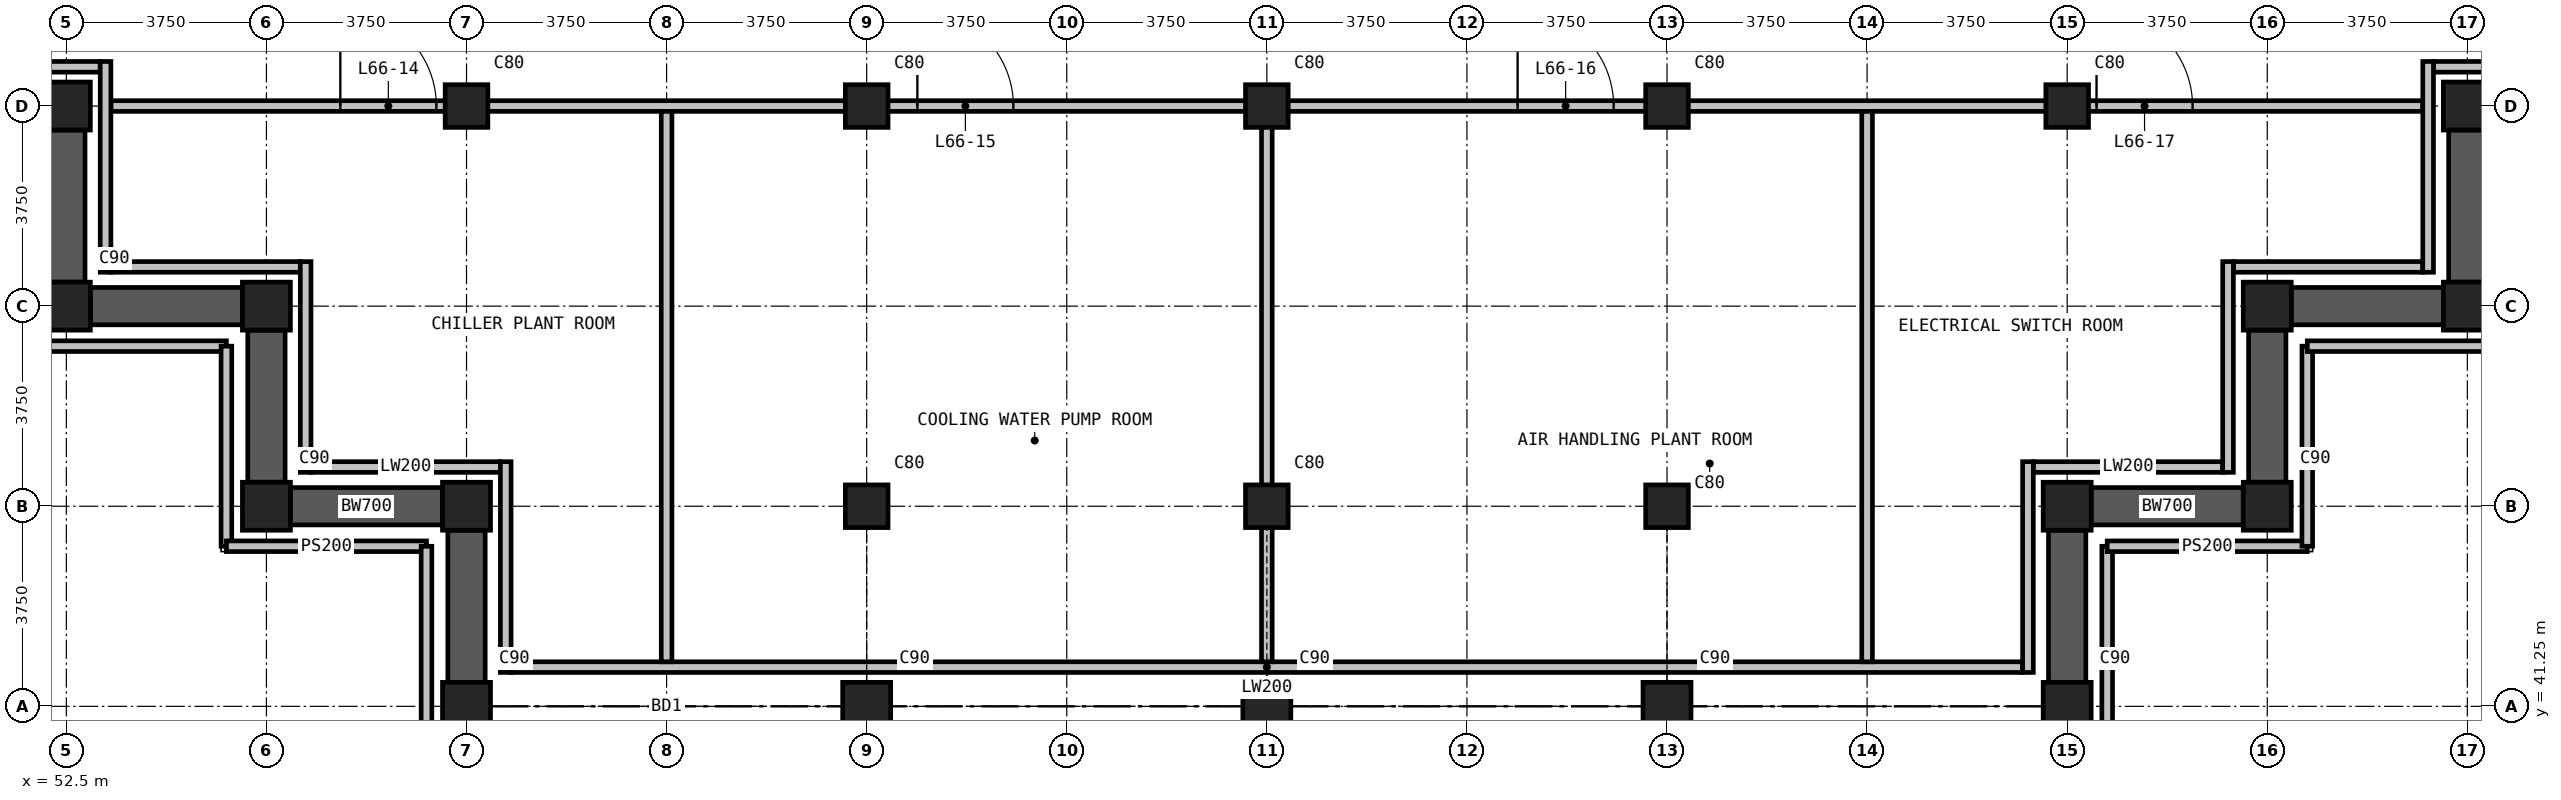
"""IFC4 building model, lengths in metres.
Left out: names, types, materials, properties, quantities, classifications, styles, units other than length and angle.
Written with IfcOpenShell. Run it as: python <this file> out.ifc"""

import sys

from ifc_helpers import new_model, si_unit, direction, frame, frame_2d, origin, origin_2d, place, context, subcontext, project, spatial, rectangle, extrude, element, fill, save


model = new_model("IFC4")
c1 = context("Model", 3, precision=1e-05, world=origin(), true_north=direction((0.0, 1.0)))
c2 = subcontext(c1, "Body", "Model", "MODEL_VIEW")
j1 = project(units=[si_unit("LENGTHUNIT", "METRE"), si_unit("PLANEANGLEUNIT", "RADIAN")], contexts=[c1])
p1 = place(None, origin())
s1 = spatial("IfcSite", under=j1, at=p1, CompositionType="ELEMENT")
p2 = place(p1, origin())
s2 = spatial("IfcBuilding", under=s1, at=p2, CompositionType="ELEMENT")
p3 = place(p2, frame((0.0, 0.0, 253.5)))
s3 = spatial("IfcBuildingStorey", under=s2, at=p3, CompositionType="ELEMENT", Elevation=253.5)
for number, where, z_axis, x_axis in (
    (1, (52.5, 48.75, 0.0), (0.0, 0.0, 1.0), (1.0, 0.0, 0.0)),
    (2, (52.5, 52.5, 0.0), (0.0, 0.0, 1.0), (1.0, 0.0, 0.0)),
    (3, (56.25, 45.0, 0.0), (0.0, 0.0, 1.0), (1.0, 0.0, 0.0)),
    (4, (56.25, 48.75, 0.0), (0.0, 0.0, 1.0), (1.0, 0.0, 0.0)),
    (5, (60.0, 41.25, 0.0), (0.0, 0.0, 1.0), (1.0, 0.0, 0.0)),
    (6, (60.0, 45.0, 0.0), (0.0, 0.0, 1.0), (1.0, 0.0, 0.0)),
):
    element("IfcColumn", number, at=place(p3, frame(where, z_axis=z_axis, x_axis=x_axis)), inside=s3, PredefinedType="COLUMN", context=c2, shape_type="SweptSolid", body=[
        extrude(rectangle(XDim=0.9, YDim=0.9, at=origin_2d()), origin(), (0.0, 0.0, 1.0), 5.0),
    ])
p4 = place(p3, frame((60.0, 52.5, 0.0), z_axis=(0.0, 0.0, 1.0), x_axis=(1.0, 0.0, 0.0)))
e7 = element("IfcColumn", 7, at=p4, inside=s3, PredefinedType="COLUMN", context=c2, shape_type="SweptSolid", body=[
    extrude(rectangle(XDim=0.8, YDim=0.8, at=origin_2d()), origin(), (0.0, 0.0, 1.0), 5.0),
])
p5 = place(p3, frame((67.5, 41.25, 0.0), z_axis=(0.0, 0.0, 1.0), x_axis=(1.0, 0.0, 0.0)))
e8 = element("IfcColumn", 8, at=p5, inside=s3, PredefinedType="COLUMN", context=c2, shape_type="SweptSolid", body=[
    extrude(rectangle(XDim=0.9, YDim=0.9, at=origin_2d()), origin(), (0.0, 0.0, 1.0), 5.0),
])
for number, where, z_axis, x_axis in (
    (9, (67.5, 45.0, 0.0), (0.0, 0.0, 1.0), (1.0, 0.0, 0.0)),
    (10, (67.5, 52.5, 0.0), (0.0, 0.0, 1.0), (1.0, 0.0, 0.0)),
):
    element("IfcColumn", number, at=place(p3, frame(where, z_axis=z_axis, x_axis=x_axis)), inside=s3, PredefinedType="COLUMN", context=c2, shape_type="SweptSolid", body=[
        extrude(rectangle(XDim=0.8, YDim=0.8, at=origin_2d()), origin(), (0.0, 0.0, 1.0), 5.0),
    ])
p6 = place(p3, frame((75.0, 41.25, 0.0), z_axis=(0.0, 0.0, 1.0), x_axis=(1.0, 0.0, 0.0)))
e11 = element("IfcColumn", 11, at=p6, inside=s3, PredefinedType="COLUMN", context=c2, shape_type="SweptSolid", body=[
    extrude(rectangle(XDim=0.9, YDim=0.9, at=origin_2d()), origin(), (0.0, 0.0, 1.0), 5.0),
])
for number, where, z_axis, x_axis in (
    (12, (75.0, 45.0, 0.0), (0.0, 0.0, 1.0), (1.0, 0.0, 0.0)),
    (13, (75.0, 52.5, 0.0), (0.0, 0.0, 1.0), (1.0, 0.0, 0.0)),
):
    element("IfcColumn", number, at=place(p3, frame(where, z_axis=z_axis, x_axis=x_axis)), inside=s3, PredefinedType="COLUMN", context=c2, shape_type="SweptSolid", body=[
        extrude(rectangle(XDim=0.8, YDim=0.8, at=origin_2d()), origin(), (0.0, 0.0, 1.0), 5.0),
    ])
p7 = place(p3, frame((82.5, 41.25, 0.0), z_axis=(0.0, 0.0, 1.0), x_axis=(1.0, 0.0, 0.0)))
e14 = element("IfcColumn", 14, at=p7, inside=s3, PredefinedType="COLUMN", context=c2, shape_type="SweptSolid", body=[
    extrude(rectangle(XDim=0.9, YDim=0.9, at=origin_2d()), origin(), (0.0, 0.0, 1.0), 5.0),
])
for number, where, z_axis, x_axis in (
    (15, (82.5, 45.0, 0.0), (0.0, 0.0, 1.0), (1.0, 0.0, 0.0)),
    (16, (82.5, 52.5, 0.0), (0.0, 0.0, 1.0), (1.0, 0.0, 0.0)),
):
    element("IfcColumn", number, at=place(p3, frame(where, z_axis=z_axis, x_axis=x_axis)), inside=s3, PredefinedType="COLUMN", context=c2, shape_type="SweptSolid", body=[
        extrude(rectangle(XDim=0.8, YDim=0.8, at=origin_2d()), origin(), (0.0, 0.0, 1.0), 5.0),
    ])
for number, where, z_axis, x_axis in (
    (17, (90.0, 41.25, 0.0), (0.0, 0.0, 1.0), (1.0, 0.0, 0.0)),
    (18, (90.0, 45.0, 0.0), (0.0, 0.0, 1.0), (1.0, 0.0, 0.0)),
):
    element("IfcColumn", number, at=place(p3, frame(where, z_axis=z_axis, x_axis=x_axis)), inside=s3, PredefinedType="COLUMN", context=c2, shape_type="SweptSolid", body=[
        extrude(rectangle(XDim=0.9, YDim=0.9, at=origin_2d()), origin(), (0.0, 0.0, 1.0), 5.0),
    ])
p8 = place(p3, frame((90.0, 52.5, 0.0), z_axis=(0.0, 0.0, 1.0), x_axis=(1.0, 0.0, 0.0)))
e19 = element("IfcColumn", 19, at=p8, inside=s3, PredefinedType="COLUMN", context=c2, shape_type="SweptSolid", body=[
    extrude(rectangle(XDim=0.8, YDim=0.8, at=origin_2d()), origin(), (0.0, 0.0, 1.0), 5.0),
])
for number, where, z_axis, x_axis in (
    (20, (93.75, 45.0, 0.0), (0.0, 0.0, 1.0), (1.0, 0.0, 0.0)),
    (21, (93.75, 48.75, 0.0), (0.0, 0.0, 1.0), (1.0, 0.0, 0.0)),
    (22, (97.5, 48.75, 0.0), (0.0, 0.0, 1.0), (1.0, 0.0, 0.0)),
    (23, (97.5, 52.5, 0.0), (0.0, 0.0, 1.0), (1.0, 0.0, 0.0)),
):
    element("IfcColumn", number, at=place(p3, frame(where, z_axis=z_axis, x_axis=x_axis)), inside=s3, PredefinedType="COLUMN", context=c2, shape_type="SweptSolid", body=[
        extrude(rectangle(XDim=0.9, YDim=0.9, at=origin_2d()), origin(), (0.0, 0.0, 1.0), 5.0),
    ])
for number, where, z_axis, x_axis in (
    (24, (97.5, 52.05, 0.0), (0.0, 0.0, 1.0), (0.0, -1.0, 0.0)),
    (25, (97.05, 48.75, 0.0), (0.0, 0.0, 1.0), (-1.0, 0.0, 0.0)),
    (26, (93.75, 48.3, 0.0), (0.0, 0.0, 1.0), (0.0, -1.0, 0.0)),
    (27, (93.3, 45.0, 0.0), (0.0, 0.0, 1.0), (-1.0, 0.0, 0.0)),
    (28, (90.0, 44.55, 0.0), (0.0, 0.0, 1.0), (0.0, -1.0, 0.0)),
    (29, (60.0, 41.7, 0.0), (0.0, 0.0, 1.0), (0.0, 1.0, 0.0)),
    (30, (59.55, 45.0, 0.0), (0.0, 0.0, 1.0), (-1.0, 0.0, 0.0)),
    (31, (56.25, 45.45, 0.0), (0.0, 0.0, 1.0), (0.0, 1.0, 0.0)),
    (32, (55.8, 48.75, 0.0), (0.0, 0.0, 1.0), (-1.0, 0.0, 0.0)),
    (33, (52.5, 49.2, 0.0), (0.0, 0.0, 1.0), (0.0, 1.0, 0.0)),
):
    element("IfcWall", number, at=place(p3, frame(where, z_axis=z_axis, x_axis=x_axis)), inside=s3, PredefinedType="SHEAR", context=c2, shape_type="SweptSolid", body=[
        extrude(rectangle(XDim=2.85, YDim=0.7, at=frame_2d((1.425, 0.0))), origin(), (0.0, 0.0, 1.0), 4.7),
    ])
for number, where, z_axis, x_axis in (
    (34, (51.75, 48.0, 0.0), (0.0, 0.0, 1.0), (1.0, 0.0, 0.0)),
    (35, (55.5, 44.25, 0.0), (0.0, 0.0, 1.0), (0.0, 1.0, 0.0)),
    (36, (55.5, 44.25, 0.0), (0.0, 0.0, 1.0), (1.0, 0.0, 0.0)),
    (37, (59.25, 40.5, 0.0), (0.0, 0.0, 1.0), (0.0, 1.0, 0.0)),
    (38, (90.75, 40.5, 0.0), (0.0, 0.0, 1.0), (0.0, 1.0, 0.0)),
    (39, (90.75, 44.25, 0.0), (0.0, 0.0, 1.0), (1.0, 0.0, 0.0)),
    (40, (94.5, 44.25, 0.0), (0.0, 0.0, 1.0), (0.0, 1.0, 0.0)),
    (41, (94.5, 48.0, 0.0), (0.0, 0.0, 1.0), (1.0, 0.0, 0.0)),
):
    element("IfcWall", number, at=place(p3, frame(where, z_axis=z_axis, x_axis=x_axis)), inside=s3, PredefinedType="SOLIDWALL", context=c2, shape_type="SweptSolid", body=[
        extrude(rectangle(XDim=3.75, YDim=0.2, at=frame_2d((1.875, 0.0))), origin(), (0.0, 0.0, 1.0), 4.7),
    ])
p9 = place(p3, frame((60.835, 41.985, 0.0), z_axis=(0.0, 0.0, 1.0), x_axis=(1.0, 0.0, 0.0)))
e42 = element("IfcWall", 42, at=p9, inside=s3, PredefinedType="PARTITIONING", context=c2, shape_type="SweptSolid", body=[
    extrude(rectangle(XDim=28.33, YDim=0.2, at=frame_2d((14.165, 0.0))), origin(), (0.0, 0.0, 1.0), 4.7),
])
for number, where, z_axis, x_axis in (
    (43, (57.085, 45.735, 0.0), (0.0, 0.0, 1.0), (1.0, 0.0, 0.0)),
    (44, (89.365, 45.735, 0.0), (0.0, 0.0, 1.0), (1.0, 0.0, 0.0)),
    (45, (53.335, 49.485, 0.0), (0.0, 0.0, 1.0), (1.0, 0.0, 0.0)),
    (46, (93.115, 49.485, 0.0), (0.0, 0.0, 1.0), (1.0, 0.0, 0.0)),
):
    element("IfcWall", number, at=place(p3, frame(where, z_axis=z_axis, x_axis=x_axis)), inside=s3, PredefinedType="PARTITIONING", context=c2, shape_type="SweptSolid", body=[
        extrude(rectangle(XDim=3.55, YDim=0.2, at=frame_2d((1.775, 0.0))), origin(), (0.0, 0.0, 1.0), 4.7),
    ])
p10 = place(p3, frame((53.335, 52.5, 0.0), z_axis=(0.0, 0.0, 1.0), x_axis=(1.0, 0.0, 0.0)))
e47 = element("IfcWall", 47, at=p10, inside=s3, PredefinedType="PARTITIONING", context=c2, shape_type="SweptSolid", body=[
    extrude(rectangle(XDim=43.33, YDim=0.2, at=frame_2d((21.665, 0.0))), origin(), (0.0, 0.0, 1.0), 4.7),
])
p11 = place(p10, frame((4.3, 0.0, 0.0)))
e48 = element("IfcOpeningElement", 48, at=p11, cuts=e47, PredefinedType="OPENING", context=c2, shape_type="SweptSolid", body=[
    extrude(rectangle(XDim=1.8, YDim=2.4, at=frame_2d((0.9, 1.2))), frame((0.0, 0.11, 0.0), z_axis=(0.0, -1.0, 0.0), x_axis=(1.0, 0.0, 0.0)), (0.0, 0.0, 1.0), 0.22),
])
p12 = place(p10, frame((15.115, 0.0, 0.0)))
e49 = element("IfcOpeningElement", 49, at=p12, cuts=e47, PredefinedType="OPENING", context=c2, shape_type="SweptSolid", body=[
    extrude(rectangle(XDim=1.8, YDim=2.4, at=frame_2d((0.9, 1.2))), frame((0.0, 0.11, 0.0), z_axis=(0.0, -1.0, 0.0), x_axis=(1.0, 0.0, 0.0)), (0.0, 0.0, 1.0), 0.22),
])
p13 = place(p10, frame((26.365, 0.0, 0.0)))
e50 = element("IfcOpeningElement", 50, at=p13, cuts=e47, PredefinedType="OPENING", context=c2, shape_type="SweptSolid", body=[
    extrude(rectangle(XDim=1.8, YDim=2.4, at=frame_2d((0.9, 1.2))), frame((0.0, 0.11, 0.0), z_axis=(0.0, -1.0, 0.0), x_axis=(1.0, 0.0, 0.0)), (0.0, 0.0, 1.0), 0.22),
])
p14 = place(p10, frame((37.215, 0.0, 0.0)))
e51 = element("IfcOpeningElement", 51, at=p14, cuts=e47, PredefinedType="OPENING", context=c2, shape_type="SweptSolid", body=[
    extrude(rectangle(XDim=1.8, YDim=2.4, at=frame_2d((0.9, 1.2))), frame((0.0, 0.11, 0.0), z_axis=(0.0, -1.0, 0.0), x_axis=(1.0, 0.0, 0.0)), (0.0, 0.0, 1.0), 0.22),
])
for number, where, z_axis, x_axis in (
    (52, (49.585, 53.235, 0.0), (0.0, 0.0, 1.0), (1.0, 0.0, 0.0)),
    (53, (96.865, 53.235, 0.0), (0.0, 0.0, 1.0), (1.0, 0.0, 0.0)),
):
    element("IfcWall", number, at=place(p3, frame(where, z_axis=z_axis, x_axis=x_axis)), inside=s3, PredefinedType="PARTITIONING", context=c2, shape_type="SweptSolid", body=[
        extrude(rectangle(XDim=3.55, YDim=0.2, at=frame_2d((1.775, 0.0))), origin(), (0.0, 0.0, 1.0), 4.7),
    ])
for number, where, z_axis, x_axis in (
    (54, (53.235, 49.385, 0.0), (0.0, 0.0, 1.0), (0.0, 1.0, 0.0)),
    (55, (56.985, 45.635, 0.0), (0.0, 0.0, 1.0), (0.0, 1.0, 0.0)),
    (56, (60.735, 41.885, 0.0), (0.0, 0.0, 1.0), (0.0, 1.0, 0.0)),
):
    element("IfcWall", number, at=place(p3, frame(where, z_axis=z_axis, x_axis=x_axis)), inside=s3, PredefinedType="PARTITIONING", context=c2, shape_type="SweptSolid", body=[
        extrude(rectangle(XDim=3.95, YDim=0.2, at=frame_2d((1.975, 0.0))), origin(), (0.0, 0.0, 1.0), 4.7),
    ])
p15 = place(p3, frame((63.75, 42.085, 0.0), z_axis=(0.0, 0.0, 1.0), x_axis=(0.0, 1.0, 0.0)))
e57 = element("IfcWall", 57, at=p15, inside=s3, PredefinedType="PARTITIONING", context=c2, shape_type="SweptSolid", body=[
    extrude(rectangle(XDim=10.315, YDim=0.2, at=frame_2d((5.157, 0.0))), origin(), (0.0, 0.0, 1.0), 4.7),
])
p16 = place(p3, frame((75.0, 42.085, 0.0), z_axis=(0.0, 0.0, 1.0), x_axis=(0.0, 1.0, 0.0)))
e58 = element("IfcWall", 58, at=p16, inside=s3, PredefinedType="PARTITIONING", context=c2, shape_type="SweptSolid", body=[
    extrude(rectangle(XDim=2.516, YDim=0.2, at=frame_2d((1.258, 0.0))), origin(), (0.0, 0.0, 1.0), 3.9),
])
p17 = place(p3, frame((75.0, 44.601, 0.0), z_axis=(0.0, 0.0, 1.0), x_axis=(0.0, 1.0, 0.0)))
e59 = element("IfcWall", 59, at=p17, inside=s3, PredefinedType="PARTITIONING", context=c2, shape_type="SweptSolid", body=[
    extrude(rectangle(XDim=7.799, YDim=0.2, at=frame_2d((3.899, 0.0))), origin(), (0.0, 0.0, 1.0), 4.7),
])
p18 = place(p3, frame((86.25, 42.085, 0.0), z_axis=(0.0, 0.0, 1.0), x_axis=(0.0, 1.0, 0.0)))
e60 = element("IfcWall", 60, at=p18, inside=s3, PredefinedType="PARTITIONING", context=c2, shape_type="SweptSolid", body=[
    extrude(rectangle(XDim=10.315, YDim=0.2, at=frame_2d((5.157, 0.0))), origin(), (0.0, 0.0, 1.0), 4.7),
])
for number, where, z_axis, x_axis in (
    (61, (89.265, 41.885, 0.0), (0.0, 0.0, 1.0), (0.0, 1.0, 0.0)),
    (62, (93.015, 45.635, 0.0), (0.0, 0.0, 1.0), (0.0, 1.0, 0.0)),
    (63, (96.765, 49.385, 0.0), (0.0, 0.0, 1.0), (0.0, 1.0, 0.0)),
):
    element("IfcWall", number, at=place(p3, frame(where, z_axis=z_axis, x_axis=x_axis)), inside=s3, PredefinedType="PARTITIONING", context=c2, shape_type="SweptSolid", body=[
        extrude(rectangle(XDim=3.95, YDim=0.2, at=frame_2d((1.975, 0.0))), origin(), (0.0, 0.0, 1.0), 4.7),
    ])
p19 = place(p11, origin())
e64 = element("IfcDoor", 64, at=p19, inside=s3, OperationType="DOUBLE_DOOR_SINGLE_SWING", PredefinedType="DOOR", context=c2, shape_type="SweptSolid", body=[
    extrude(rectangle(XDim=1.8, YDim=2.4, at=frame_2d((0.9, 1.2))), frame((0.0, 0.025, 0.0), z_axis=(0.0, -1.0, 0.0), x_axis=(1.0, 0.0, 0.0)), (0.0, 0.0, 1.0), 0.05),
])
fill(e48, e64)
p20 = place(p12, origin())
e65 = element("IfcDoor", 65, at=p20, inside=s3, OperationType="DOUBLE_DOOR_SINGLE_SWING", PredefinedType="DOOR", context=c2, shape_type="SweptSolid", body=[
    extrude(rectangle(XDim=1.8, YDim=2.4, at=frame_2d((0.9, 1.2))), frame((0.0, 0.025, 0.0), z_axis=(0.0, -1.0, 0.0), x_axis=(1.0, 0.0, 0.0)), (0.0, 0.0, 1.0), 0.05),
])
fill(e49, e65)
p21 = place(p13, origin())
e66 = element("IfcDoor", 66, at=p21, inside=s3, OperationType="DOUBLE_DOOR_SINGLE_SWING", PredefinedType="DOOR", context=c2, shape_type="SweptSolid", body=[
    extrude(rectangle(XDim=1.8, YDim=2.4, at=frame_2d((0.9, 1.2))), frame((0.0, 0.025, 0.0), z_axis=(0.0, -1.0, 0.0), x_axis=(1.0, 0.0, 0.0)), (0.0, 0.0, 1.0), 0.05),
])
fill(e50, e66)
p22 = place(p14, origin())
e67 = element("IfcDoor", 67, at=p22, inside=s3, OperationType="DOUBLE_DOOR_SINGLE_SWING", PredefinedType="DOOR", context=c2, shape_type="SweptSolid", body=[
    extrude(rectangle(XDim=1.8, YDim=2.4, at=frame_2d((0.9, 1.2))), frame((0.0, 0.025, 0.0), z_axis=(0.0, -1.0, 0.0), x_axis=(1.0, 0.0, 0.0)), (0.0, 0.0, 1.0), 0.05),
])
fill(e51, e67)
save(model, sys.argv[1])
